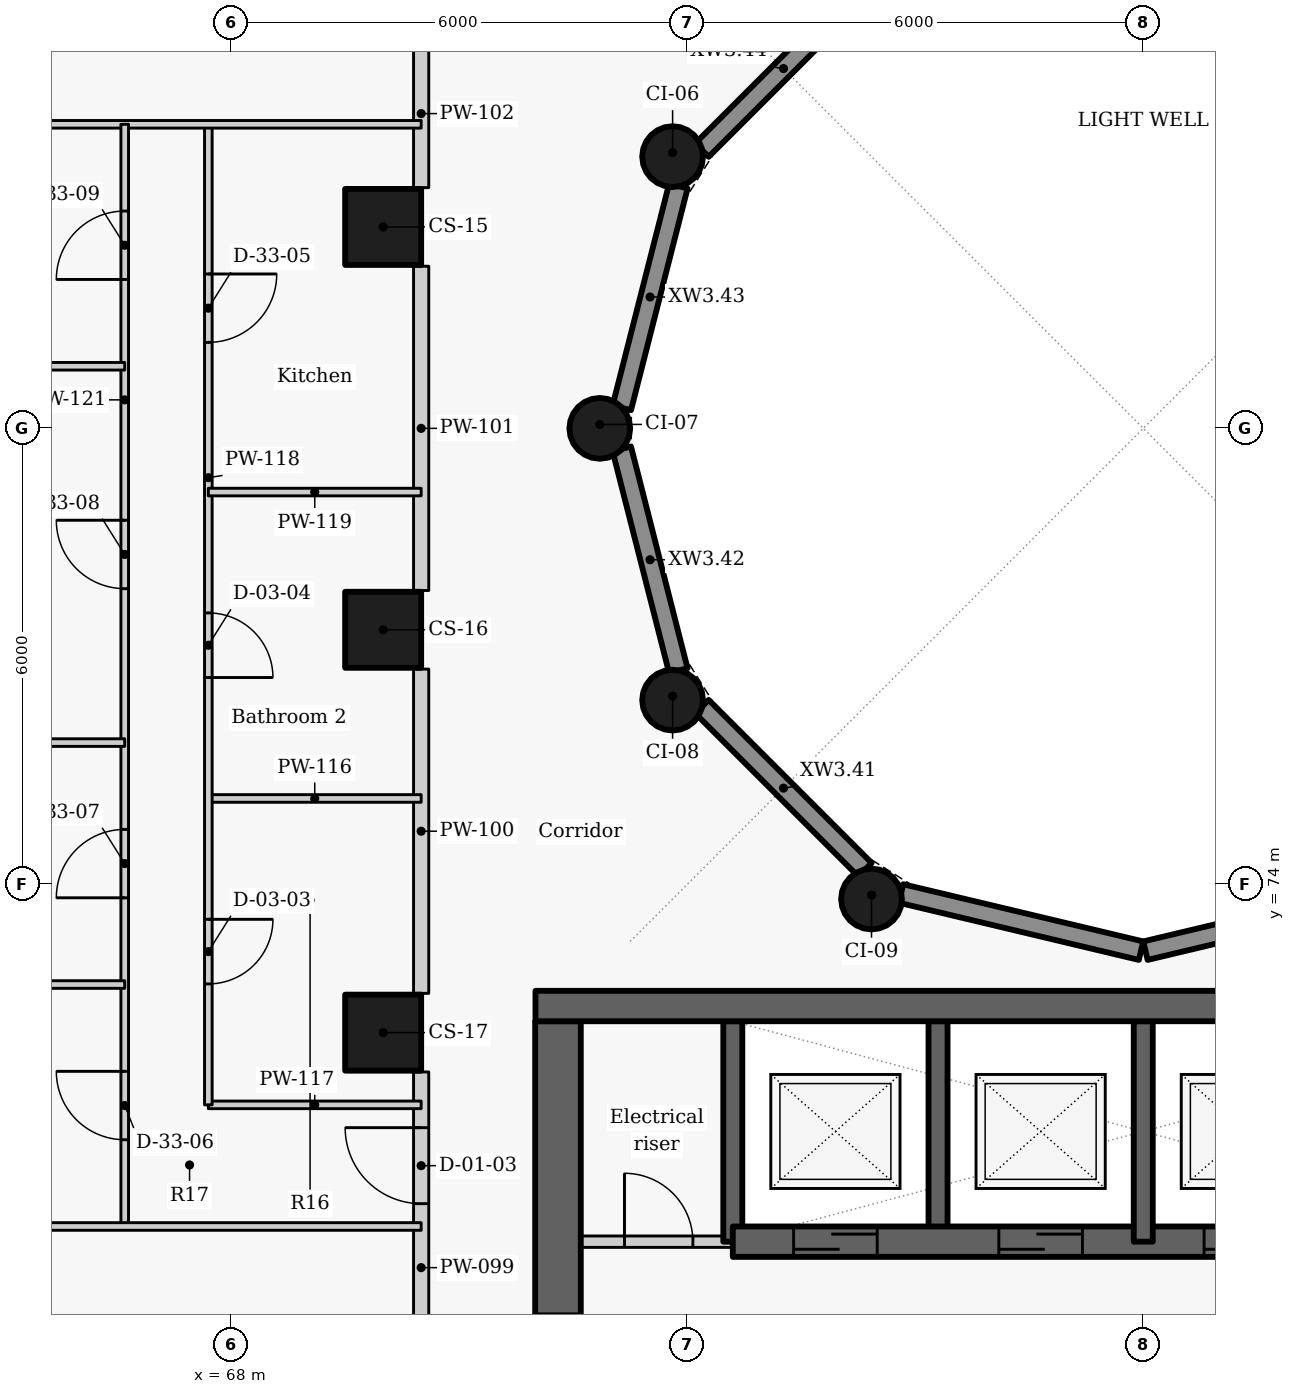
"""IFC4 building model, lengths in metres.
Left out: names, types, materials, properties, quantities, classifications, styles, units other than length and angle.
Written with IfcOpenShell. Run it as: python <this file> out.ifc"""

import sys

from ifc_helpers import new_model, si_unit, direction, frame, frame_2d, origin, origin_2d, place, context, subcontext, project, spatial, rectangle, circle, extrude, element, fill, save


model = new_model("IFC4")
c1 = context("Model", 3, precision=1e-05, world=origin(), true_north=direction((0.0, 1.0)))
c2 = subcontext(c1, "Body", "Model", "MODEL_VIEW")
j1 = project(units=[si_unit("LENGTHUNIT", "METRE"), si_unit("PLANEANGLEUNIT", "RADIAN")], contexts=[c1])
p1 = place(None, origin())
s1 = spatial("IfcSite", under=j1, at=p1, CompositionType="ELEMENT")
p2 = place(p1, origin())
s2 = spatial("IfcBuilding", under=s1, at=p2, CompositionType="ELEMENT")
p3 = place(p2, frame((0.0, 0.0, 87.6)))
s3 = spatial("IfcBuildingStorey", under=s2, at=p3, CompositionType="ELEMENT", Elevation=87.6)
for number, where, z_axis, x_axis in (
    (1, (70.0, 82.65, 0.0), (0.0, 0.0, 1.0), (0.0, -1.0, 0.0)),
    (2, (70.0, 77.35, 0.0), (0.0, 0.0, 1.0), (0.0, -1.0, 0.0)),
    (3, (70.0, 72.05, 0.0), (0.0, 0.0, 1.0), (0.0, -1.0, 0.0)),
):
    element("IfcColumn", number, at=place(p3, frame(where, z_axis=z_axis, x_axis=x_axis)), inside=s3, PredefinedType="COLUMN", context=c2, shape_type="SweptSolid", body=[
        extrude(rectangle(XDim=1.0, YDim=1.0, at=origin_2d()), origin(), (0.0, 0.0, 1.0), 3.3),
    ])
for number, where, z_axis, x_axis in (
    (4, (73.808, 83.575, 0.0), (0.0, 0.0, 1.0), (-0.5, -0.866, 0.0)),
    (5, (72.85, 80.0, 0.0), (0.0, 0.0, 1.0), (0.0, -1.0, 0.0)),
    (6, (73.808, 76.425, 0.0), (0.0, 0.0, 1.0), (0.5, -0.866, 0.0)),
    (7, (76.425, 73.808, 0.0), (0.0, 0.0, 1.0), (0.866, -0.5, 0.0)),
):
    element("IfcColumn", number, at=place(p3, frame(where, z_axis=z_axis, x_axis=x_axis)), inside=s3, PredefinedType="COLUMN", context=c2, shape_type="SweptSolid", body=[
        extrude(circle(Radius=0.4, at=origin_2d()), origin(), (0.0, 0.0, 1.0), 3.3),
    ])
for number, where, z_axis, x_axis in (
    (8, (83.186, 73.881, 0.0), (0.0, 0.0, 1.0), (-0.973, -0.232, 0.0)),
    (9, (79.971, 73.128, 0.0), (0.0, 0.0, 1.0), (-0.973, 0.232, 0.0)),
):
    element("IfcWall", number, at=place(p3, frame(where, z_axis=z_axis, x_axis=x_axis)), inside=s3, PredefinedType="SOLIDWALL", context=c2, shape_type="SweptSolid", body=[
        extrude(rectangle(XDim=3.246, YDim=0.25, at=frame_2d((1.623, 0.0))), origin(), (0.0, 0.0, 1.0), 2.425),
    ])
p4 = place(p3, frame((76.339, 74.194, 0.0), z_axis=(0.0, 0.0, 1.0), x_axis=(-0.707106781187, 0.707106781187, 0.0)))
e10 = element("IfcWall", 10, at=p4, inside=s3, PredefinedType="SOLIDWALL", context=c2, shape_type="SweptSolid", body=[
    extrude(rectangle(XDim=3.033, YDim=0.25, at=frame_2d((1.517, 0.0))), origin(), (0.0, 0.0, 1.0), 2.425),
])
for number, where, z_axis, x_axis in (
    (11, (73.883, 76.813, 0.0), (0.0, 0.0, 1.0), (-0.247, 0.969, 0.0)),
    (12, (73.14, 80.27, 0.0), (0.0, 0.0, 1.0), (0.247, 0.969, 0.0)),
):
    element("IfcWall", number, at=place(p3, frame(where, z_axis=z_axis, x_axis=x_axis)), inside=s3, PredefinedType="SOLIDWALL", context=c2, shape_type="SweptSolid", body=[
        extrude(rectangle(XDim=3.01, YDim=0.25, at=frame_2d((1.505, 0.0))), origin(), (0.0, 0.0, 1.0), 2.425),
    ])
p5 = place(p3, frame((74.194, 83.661, 0.0), z_axis=(0.0, 0.0, 1.0), x_axis=(0.707106781187, 0.707106781187, 0.0)))
e13 = element("IfcWall", 13, at=p5, inside=s3, PredefinedType="SOLIDWALL", context=c2, shape_type="SweptSolid", body=[
    extrude(rectangle(XDim=3.033, YDim=0.25, at=frame_2d((1.517, 0.0))), origin(), (0.0, 0.0, 1.0), 2.425),
])
p6 = place(p3, frame((74.6, 69.3, -0.275), z_axis=(0.0, 0.0, 1.0), x_axis=(0.0, 1.0, 0.0)))
e14 = element("IfcWall", 14, at=p6, inside=s3, PredefinedType="SHEAR", context=c2, shape_type="SweptSolid", body=[
    extrude(rectangle(XDim=2.9, YDim=0.25, at=frame_2d((1.45, 0.0))), origin(), (0.0, 0.0, 1.0), 3.3),
])
p7 = place(p3, frame((72.0, 69.3, 0.0), z_axis=(0.0, 0.0, 1.0), x_axis=(1.0, 0.0, 0.0)))
e15 = element("IfcWall", 15, at=p7, inside=s3, PredefinedType="PARTITIONING", context=c2, shape_type="SweptSolid", body=[
    extrude(rectangle(XDim=2.6, YDim=0.15, at=frame_2d((1.3, 0.0))), origin(), (0.0, 0.0, 1.0), 3.025),
])
p8 = place(p7, frame((1.175, 0.0, 0.0)))
e16 = element("IfcOpeningElement", 16, at=p8, cuts=e15, PredefinedType="OPENING", context=c2, shape_type="SweptSolid", body=[
    extrude(rectangle(XDim=0.9, YDim=2.1, at=frame_2d((0.45, 1.05))), frame((0.0, 0.085, 0.0), z_axis=(0.0, -1.0, 0.0), x_axis=(1.0, 0.0, 0.0)), (0.0, 0.0, 1.0), 0.17),
])
p9 = place(p3, frame((72.3, 63.1, -0.275), z_axis=(0.0, 0.0, 1.0), x_axis=(0.0, 1.0, 0.0)))
e17 = element("IfcWall", 17, at=p9, inside=s3, PredefinedType="SHEAR", context=c2, shape_type="SweptSolid", body=[
    extrude(rectangle(XDim=9.1, YDim=0.6, at=frame_2d((4.55, 0.0))), origin(), (0.0, 0.0, 1.0), 3.3),
])
p10 = place(p9, frame((3.75, 0.0, 0.275)))
e18 = element("IfcOpeningElement", 18, at=p10, cuts=e17, PredefinedType="OPENING", context=c2, shape_type="SweptSolid", body=[
    extrude(rectangle(XDim=1.5, YDim=2.1, at=frame_2d((0.75, 1.05))), frame((0.0, 0.31, 0.0), z_axis=(0.0, -1.0, 0.0), x_axis=(1.0, 0.0, 0.0)), (0.0, 0.0, 1.0), 0.62),
])
p11 = place(p3, frame((77.3, 69.3, -0.275), z_axis=(0.0, 0.0, 1.0), x_axis=(0.0, 1.0, 0.0)))
e19 = element("IfcWall", 19, at=p11, inside=s3, PredefinedType="SHEAR", context=c2, shape_type="SweptSolid", body=[
    extrude(rectangle(XDim=2.9, YDim=0.25, at=frame_2d((1.45, 0.0))), origin(), (0.0, 0.0, 1.0), 3.3),
])
p12 = place(p3, frame((74.6, 69.3, -0.275), z_axis=(0.0, 0.0, 1.0), x_axis=(1.0, 0.0, 0.0)))
e20 = element("IfcWall", 20, at=p12, inside=s3, PredefinedType="SHEAR", context=c2, shape_type="SweptSolid", body=[
    extrude(rectangle(XDim=10.8, YDim=0.4, at=frame_2d((5.4, 0.0))), origin(), (0.0, 0.0, 1.0), 3.3),
])
p13 = place(p12, frame((0.8, 0.0, 0.275)))
e21 = element("IfcOpeningElement", 21, at=p13, cuts=e20, PredefinedType="OPENING", context=c2, shape_type="SweptSolid", body=[
    extrude(rectangle(XDim=1.1, YDim=2.1, at=frame_2d((0.55, 1.05))), frame((0.0, 0.21, 0.0), z_axis=(0.0, -1.0, 0.0), x_axis=(1.0, 0.0, 0.0)), (0.0, 0.0, 1.0), 0.42),
])
p14 = place(p12, frame((3.5, 0.0, 0.275)))
e22 = element("IfcOpeningElement", 22, at=p14, cuts=e20, PredefinedType="OPENING", context=c2, shape_type="SweptSolid", body=[
    extrude(rectangle(XDim=1.1, YDim=2.1, at=frame_2d((0.55, 1.05))), frame((0.0, 0.21, 0.0), z_axis=(0.0, -1.0, 0.0), x_axis=(1.0, 0.0, 0.0)), (0.0, 0.0, 1.0), 0.42),
])
p15 = place(p12, frame((6.2, 0.0, 0.275)))
e23 = element("IfcOpeningElement", 23, at=p15, cuts=e20, PredefinedType="OPENING", context=c2, shape_type="SweptSolid", body=[
    extrude(rectangle(XDim=1.1, YDim=2.1, at=frame_2d((0.55, 1.05))), frame((0.0, 0.21, 0.0), z_axis=(0.0, -1.0, 0.0), x_axis=(1.0, 0.0, 0.0)), (0.0, 0.0, 1.0), 0.42),
])
p16 = place(p3, frame((80.0, 69.3, -0.275), z_axis=(0.0, 0.0, 1.0), x_axis=(0.0, 1.0, 0.0)))
e24 = element("IfcWall", 24, at=p16, inside=s3, PredefinedType="SHEAR", context=c2, shape_type="SweptSolid", body=[
    extrude(rectangle(XDim=2.9, YDim=0.25, at=frame_2d((1.45, 0.0))), origin(), (0.0, 0.0, 1.0), 3.3),
])
p17 = place(p3, frame((70.5, 68.217, 0.0), z_axis=(0.0, 0.0, 1.0), x_axis=(0.0, 1.0, 0.0)))
e25 = element("IfcWall", 25, at=p17, inside=s3, PredefinedType="PARTITIONING", context=c2, shape_type="SweptSolid", body=[
    extrude(rectangle(XDim=3.316, YDim=0.2, at=frame_2d((1.658, 0.0))), origin(), (0.0, 0.0, 1.0), 3.025),
])
p18 = place(p17, frame((1.583, 0.0, 0.0)))
e26 = element("IfcOpeningElement", 26, at=p18, cuts=e25, PredefinedType="OPENING", context=c2, shape_type="SweptSolid", body=[
    extrude(rectangle(XDim=1.0, YDim=2.1, at=frame_2d((0.5, 1.05))), frame((0.0, 0.11, 0.0), z_axis=(0.0, -1.0, 0.0), x_axis=(1.0, 0.0, 0.0)), (0.0, 0.0, 1.0), 0.22),
])
for number, where, z_axis, x_axis in (
    (27, (70.5, 72.567, 0.0), (0.0, 0.0, 1.0), (0.0, 1.0, 0.0)),
    (28, (70.5, 77.867, 0.0), (0.0, 0.0, 1.0), (0.0, 1.0, 0.0)),
):
    element("IfcWall", number, at=place(p3, frame(where, z_axis=z_axis, x_axis=x_axis)), inside=s3, PredefinedType="PARTITIONING", context=c2, shape_type="SweptSolid", body=[
        extrude(rectangle(XDim=4.266, YDim=0.2, at=frame_2d((2.133, 0.0))), origin(), (0.0, 0.0, 1.0), 3.025),
    ])
p19 = place(p3, frame((70.5, 83.167, 0.0), z_axis=(0.0, 0.0, 1.0), x_axis=(0.0, 1.0, 0.0)))
e29 = element("IfcWall", 29, at=p19, inside=s3, PredefinedType="PARTITIONING", context=c2, shape_type="SweptSolid", body=[
    extrude(rectangle(XDim=4.266, YDim=0.2, at=frame_2d((2.133, 0.0))), origin(), (0.0, 0.0, 1.0), 3.025),
])
p20 = place(p19, frame((2.048, 0.0, 0.0)))
e30 = element("IfcOpeningElement", 30, at=p20, cuts=e29, PredefinedType="OPENING", context=c2, shape_type="SweptSolid", body=[
    extrude(rectangle(XDim=1.0, YDim=2.1, at=frame_2d((0.5, 1.05))), frame((0.0, 0.11, 0.0), z_axis=(0.0, -1.0, 0.0), x_axis=(1.0, 0.0, 0.0)), (0.0, 0.0, 1.0), 0.22),
])
for number, where, z_axis, x_axis in (
    (31, (67.7, 75.131, 0.0), (0.0, 0.0, 1.0), (1.0, 0.0, 0.0)),
    (32, (67.7, 71.1, 0.0), (0.0, 0.0, 1.0), (1.0, 0.0, 0.0)),
):
    element("IfcWall", number, at=place(p3, frame(where, z_axis=z_axis, x_axis=x_axis)), inside=s3, PredefinedType="PARTITIONING", context=c2, shape_type="SweptSolid", body=[
        extrude(rectangle(XDim=2.8, YDim=0.1, at=frame_2d((1.4, 0.0))), origin(), (0.0, 0.0, 1.0), 2.505),
    ])
p21 = place(p3, frame((67.7, 84.0, 0.0), z_axis=(0.0, 0.0, 1.0), x_axis=(0.0, -1.0, 0.0)))
e33 = element("IfcWall", 33, at=p21, inside=s3, PredefinedType="PARTITIONING", context=c2, shape_type="SweptSolid", body=[
    extrude(rectangle(XDim=12.9, YDim=0.1, at=frame_2d((6.45, 0.0))), origin(), (0.0, 0.0, 1.0), 3.025),
])
p22 = place(p21, frame((10.459, 0.0, 0.0)))
e34 = element("IfcOpeningElement", 34, at=p22, cuts=e33, PredefinedType="OPENING", context=c2, shape_type="SweptSolid", body=[
    extrude(rectangle(XDim=0.85, YDim=2.1, at=frame_2d((0.425, 1.05))), frame((0.0, 0.06, 0.0), z_axis=(0.0, -1.0, 0.0), x_axis=(1.0, 0.0, 0.0)), (0.0, 0.0, 1.0), 0.12),
])
p23 = place(p21, frame((6.428, 0.0, 0.0)))
e35 = element("IfcOpeningElement", 35, at=p23, cuts=e33, PredefinedType="OPENING", context=c2, shape_type="SweptSolid", body=[
    extrude(rectangle(XDim=0.85, YDim=2.1, at=frame_2d((0.425, 1.05))), frame((0.0, 0.06, 0.0), z_axis=(0.0, -1.0, 0.0), x_axis=(1.0, 0.0, 0.0)), (0.0, 0.0, 1.0), 0.12),
])
p24 = place(p21, frame((1.969, 0.0, 0.0)))
e36 = element("IfcOpeningElement", 36, at=p24, cuts=e33, PredefinedType="OPENING", context=c2, shape_type="SweptSolid", body=[
    extrude(rectangle(XDim=0.9, YDim=2.1, at=frame_2d((0.45, 1.05))), frame((0.0, 0.06, 0.0), z_axis=(0.0, -1.0, 0.0), x_axis=(1.0, 0.0, 0.0)), (0.0, 0.0, 1.0), 0.12),
])
p25 = place(p3, frame((67.7, 79.162, 0.0), z_axis=(0.0, 0.0, 1.0), x_axis=(1.0, 0.0, 0.0)))
e37 = element("IfcWall", 37, at=p25, inside=s3, PredefinedType="PARTITIONING", context=c2, shape_type="SweptSolid", body=[
    extrude(rectangle(XDim=2.8, YDim=0.1, at=frame_2d((1.4, 0.0))), origin(), (0.0, 0.0, 1.0), 2.505),
])
p26 = place(p3, frame((54.943, 84.0, 0.0), z_axis=(0.0, 0.0, 1.0), x_axis=(1.0, 0.0, 0.0)))
e38 = element("IfcWall", 38, at=p26, inside=s3, PredefinedType="PARTITIONING", context=c2, shape_type="SweptSolid", body=[
    extrude(rectangle(XDim=15.557, YDim=0.1, at=frame_2d((7.778, 0.0))), origin(), (0.0, 0.0, 1.0), 2.405),
])
p27 = place(p3, frame((66.6, 69.5, 0.0), z_axis=(0.0, 0.0, 1.0), x_axis=(0.0, 1.0, 0.0)))
e39 = element("IfcWall", 39, at=p27, inside=s3, PredefinedType="PARTITIONING", context=c2, shape_type="SweptSolid", body=[
    extrude(rectangle(XDim=14.5, YDim=0.1, at=frame_2d((7.25, 0.0))), origin(), (0.0, 0.0, 1.0), 3.025),
])
p28 = place(p27, frame((1.141, 0.0, 0.0)))
e40 = element("IfcOpeningElement", 40, at=p28, cuts=e39, PredefinedType="OPENING", context=c2, shape_type="SweptSolid", body=[
    extrude(rectangle(XDim=0.9, YDim=2.1, at=frame_2d((0.45, 1.05))), frame((0.0, 0.06, 0.0), z_axis=(0.0, -1.0, 0.0), x_axis=(1.0, 0.0, 0.0)), (0.0, 0.0, 1.0), 0.12),
])
p29 = place(p27, frame((4.324, 0.0, 0.0)))
e41 = element("IfcOpeningElement", 41, at=p29, cuts=e39, PredefinedType="OPENING", context=c2, shape_type="SweptSolid", body=[
    extrude(rectangle(XDim=0.9, YDim=2.1, at=frame_2d((0.45, 1.05))), frame((0.0, 0.06, 0.0), z_axis=(0.0, -1.0, 0.0), x_axis=(1.0, 0.0, 0.0)), (0.0, 0.0, 1.0), 0.12),
])
p30 = place(p27, frame((8.391, 0.0, 0.0)))
e42 = element("IfcOpeningElement", 42, at=p30, cuts=e39, PredefinedType="OPENING", context=c2, shape_type="SweptSolid", body=[
    extrude(rectangle(XDim=0.9, YDim=2.1, at=frame_2d((0.45, 1.05))), frame((0.0, 0.06, 0.0), z_axis=(0.0, -1.0, 0.0), x_axis=(1.0, 0.0, 0.0)), (0.0, 0.0, 1.0), 0.12),
])
p31 = place(p27, frame((12.459, 0.0, 0.0)))
e43 = element("IfcOpeningElement", 43, at=p31, cuts=e39, PredefinedType="OPENING", context=c2, shape_type="SweptSolid", body=[
    extrude(rectangle(XDim=0.9, YDim=2.1, at=frame_2d((0.45, 1.05))), frame((0.0, 0.06, 0.0), z_axis=(0.0, -1.0, 0.0), x_axis=(1.0, 0.0, 0.0)), (0.0, 0.0, 1.0), 0.12),
])
p32 = place(p3, frame((58.696, 69.5, 0.0), z_axis=(0.0, 0.0, 1.0), x_axis=(1.0, 0.0, 0.0)))
e44 = element("IfcWall", 44, at=p32, inside=s3, PredefinedType="PARTITIONING", context=c2, shape_type="SweptSolid", body=[
    extrude(rectangle(XDim=11.804, YDim=0.1, at=frame_2d((5.902, 0.0))), origin(), (0.0, 0.0, 1.0), 2.405),
])
p33 = place(p3, frame((57.574, 72.683, 0.0), z_axis=(0.0, 0.0, 1.0), x_axis=(1.0, 0.0, 0.0)))
e45 = element("IfcWall", 45, at=p33, inside=s3, PredefinedType="PARTITIONING", context=c2, shape_type="SweptSolid", body=[
    extrude(rectangle(XDim=9.026, YDim=0.1, at=frame_2d((4.513, 0.0))), origin(), (0.0, 0.0, 1.0), 3.025),
])
p34 = place(p3, frame((55.021, 75.866, 0.0), z_axis=(0.0, 0.0, 1.0), x_axis=(1.0, 0.0, 0.0)))
e46 = element("IfcWall", 46, at=p34, inside=s3, PredefinedType="PARTITIONING", context=c2, shape_type="SweptSolid", body=[
    extrude(rectangle(XDim=11.58, YDim=0.1, at=frame_2d((5.79, 0.0))), origin(), (0.0, 0.0, 1.0), 2.405),
])
p35 = place(p3, frame((62.392, 80.817, 0.0), z_axis=(0.0, 0.0, 1.0), x_axis=(1.0, 0.0, 0.0)))
e47 = element("IfcWall", 47, at=p35, inside=s3, PredefinedType="PARTITIONING", context=c2, shape_type="SweptSolid", body=[
    extrude(rectangle(XDim=4.208, YDim=0.1, at=frame_2d((2.104, 0.0))), origin(), (0.0, 0.0, 1.0), 2.405),
])
p36 = place(p3, frame((72.004, 72.4, -0.275), z_axis=(0.0, 0.0, 1.0), x_axis=(1.0, 0.0, 0.0)))
e48 = element("IfcWall", 48, at=p36, inside=s3, PredefinedType="SHEAR", context=c2, shape_type="SweptSolid", body=[
    extrude(rectangle(XDim=15.992, YDim=0.4, at=frame_2d((7.996, 0.0))), origin(), (0.0, 0.0, 1.0), 3.3),
])
p37 = place(p8, origin())
e49 = element("IfcDoor", 49, at=p37, inside=s3, OperationType="SINGLE_SWING_LEFT", PredefinedType="DOOR", context=c2, shape_type="SweptSolid", body=[
    extrude(rectangle(XDim=0.9, YDim=2.1, at=frame_2d((0.45, 1.05))), frame((0.0, 0.025, 0.0), z_axis=(0.0, -1.0, 0.0), x_axis=(1.0, 0.0, 0.0)), (0.0, 0.0, 1.0), 0.05),
])
fill(e16, e49)
p38 = place(p13, origin())
e50 = element("IfcDoor", 50, at=p38, inside=s3, OperationType="SLIDING_TO_LEFT", PredefinedType="DOOR", context=c2, shape_type="SweptSolid", body=[
    extrude(rectangle(XDim=1.1, YDim=2.1, at=frame_2d((0.55, 1.05))), frame((0.0, 0.025, 0.0), z_axis=(0.0, -1.0, 0.0), x_axis=(1.0, 0.0, 0.0)), (0.0, 0.0, 1.0), 0.05),
])
fill(e21, e50)
p39 = place(p14, origin())
e51 = element("IfcDoor", 51, at=p39, inside=s3, OperationType="SLIDING_TO_LEFT", PredefinedType="DOOR", context=c2, shape_type="SweptSolid", body=[
    extrude(rectangle(XDim=1.1, YDim=2.1, at=frame_2d((0.55, 1.05))), frame((0.0, 0.025, 0.0), z_axis=(0.0, -1.0, 0.0), x_axis=(1.0, 0.0, 0.0)), (0.0, 0.0, 1.0), 0.05),
])
fill(e22, e51)
p40 = place(p15, origin())
e52 = element("IfcDoor", 52, at=p40, inside=s3, OperationType="SLIDING_TO_LEFT", PredefinedType="DOOR", context=c2, shape_type="SweptSolid", body=[
    extrude(rectangle(XDim=1.1, YDim=2.1, at=frame_2d((0.55, 1.05))), frame((0.0, 0.025, 0.0), z_axis=(0.0, -1.0, 0.0), x_axis=(1.0, 0.0, 0.0)), (0.0, 0.0, 1.0), 0.05),
])
fill(e23, e52)
p41 = place(p18, origin())
e53 = element("IfcDoor", 53, at=p41, inside=s3, OperationType="SINGLE_SWING_RIGHT", PredefinedType="DOOR", context=c2, shape_type="SweptSolid", body=[
    extrude(rectangle(XDim=1.0, YDim=2.1, at=frame_2d((0.5, 1.05))), frame((0.0, 0.025, 0.0), z_axis=(0.0, -1.0, 0.0), x_axis=(1.0, 0.0, 0.0)), (0.0, 0.0, 1.0), 0.05),
])
fill(e26, e53)
p42 = place(p22, origin())
e54 = element("IfcDoor", 54, at=p42, inside=s3, OperationType="SINGLE_SWING_LEFT", PredefinedType="DOOR", context=c2, shape_type="SweptSolid", body=[
    extrude(rectangle(XDim=0.85, YDim=2.1, at=frame_2d((0.425, 1.05))), frame((0.0, 0.025, 0.0), z_axis=(0.0, -1.0, 0.0), x_axis=(1.0, 0.0, 0.0)), (0.0, 0.0, 1.0), 0.05),
])
fill(e34, e54)
p43 = place(p23, origin())
e55 = element("IfcDoor", 55, at=p43, inside=s3, OperationType="SINGLE_SWING_RIGHT", PredefinedType="DOOR", context=c2, shape_type="SweptSolid", body=[
    extrude(rectangle(XDim=0.85, YDim=2.1, at=frame_2d((0.425, 1.05))), frame((0.0, 0.025, 0.0), z_axis=(0.0, -1.0, 0.0), x_axis=(1.0, 0.0, 0.0)), (0.0, 0.0, 1.0), 0.05),
])
fill(e35, e55)
p44 = place(p24, origin())
e56 = element("IfcDoor", 56, at=p44, inside=s3, OperationType="SINGLE_SWING_LEFT", PredefinedType="DOOR", context=c2, shape_type="SweptSolid", body=[
    extrude(rectangle(XDim=0.9, YDim=2.1, at=frame_2d((0.45, 1.05))), frame((0.0, 0.025, 0.0), z_axis=(0.0, -1.0, 0.0), x_axis=(1.0, 0.0, 0.0)), (0.0, 0.0, 1.0), 0.05),
])
fill(e36, e56)
p45 = place(p28, origin())
e57 = element("IfcDoor", 57, at=p45, inside=s3, OperationType="SINGLE_SWING_RIGHT", PredefinedType="DOOR", context=c2, shape_type="SweptSolid", body=[
    extrude(rectangle(XDim=0.9, YDim=2.1, at=frame_2d((0.45, 1.05))), frame((0.0, 0.025, 0.0), z_axis=(0.0, -1.0, 0.0), x_axis=(1.0, 0.0, 0.0)), (0.0, 0.0, 1.0), 0.05),
])
fill(e40, e57)
p46 = place(p29, origin())
e58 = element("IfcDoor", 58, at=p46, inside=s3, OperationType="SINGLE_SWING_LEFT", PredefinedType="DOOR", context=c2, shape_type="SweptSolid", body=[
    extrude(rectangle(XDim=0.9, YDim=2.1, at=frame_2d((0.45, 1.05))), frame((0.0, 0.025, 0.0), z_axis=(0.0, -1.0, 0.0), x_axis=(1.0, 0.0, 0.0)), (0.0, 0.0, 1.0), 0.05),
])
fill(e41, e58)
p47 = place(p30, origin())
e59 = element("IfcDoor", 59, at=p47, inside=s3, OperationType="SINGLE_SWING_RIGHT", PredefinedType="DOOR", context=c2, shape_type="SweptSolid", body=[
    extrude(rectangle(XDim=0.9, YDim=2.1, at=frame_2d((0.45, 1.05))), frame((0.0, 0.025, 0.0), z_axis=(0.0, -1.0, 0.0), x_axis=(1.0, 0.0, 0.0)), (0.0, 0.0, 1.0), 0.05),
])
fill(e42, e59)
p48 = place(p31, origin())
e60 = element("IfcDoor", 60, at=p48, inside=s3, OperationType="SINGLE_SWING_LEFT", PredefinedType="DOOR", context=c2, shape_type="SweptSolid", body=[
    extrude(rectangle(XDim=0.9, YDim=2.1, at=frame_2d((0.45, 1.05))), frame((0.0, 0.025, 0.0), z_axis=(0.0, -1.0, 0.0), x_axis=(1.0, 0.0, 0.0)), (0.0, 0.0, 1.0), 0.05),
])
fill(e43, e60)
save(model, sys.argv[1])
